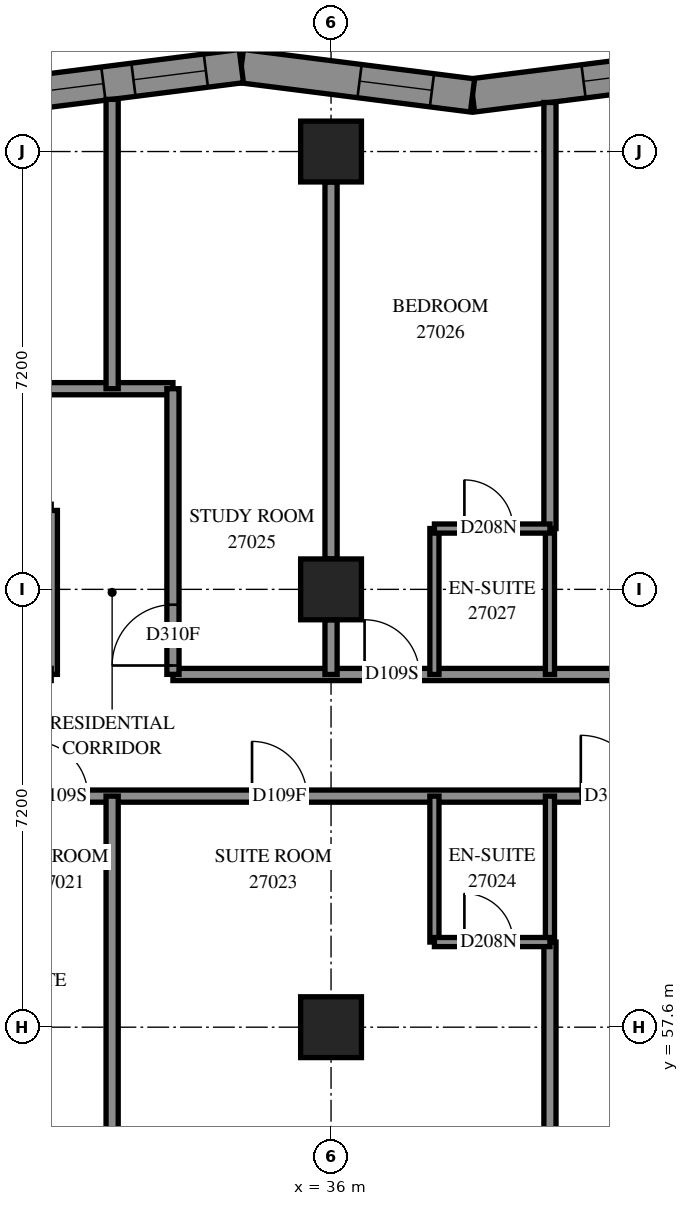
"""IFC4 building model, lengths in metres.
Left out: names, types, materials, properties, quantities, classifications, styles, units other than length and angle.
Written with IfcOpenShell. Run it as: python <this file> out.ifc"""

import sys

from ifc_helpers import new_model, si_unit, direction, frame, frame_2d, origin, origin_2d, place, context, subcontext, project, spatial, polyline, rectangle, outline, extrude, element, fill, save


model = new_model("IFC4")
c1 = context("Model", 3, precision=1e-05, world=origin(), true_north=direction((0.0, 1.0)))
c2 = subcontext(c1, "Body", "Model", "MODEL_VIEW")
j1 = project(units=[si_unit("LENGTHUNIT", "METRE"), si_unit("PLANEANGLEUNIT", "RADIAN")], contexts=[c1])
p1 = place(None, origin())
s1 = spatial("IfcSite", under=j1, at=p1, CompositionType="ELEMENT")
p2 = place(p1, origin())
s2 = spatial("IfcBuilding", under=s1, at=p2, CompositionType="ELEMENT")
p3 = place(p2, frame((0.0, 0.0, 101.6)))
s3 = spatial("IfcBuildingStorey", under=s2, at=p3, CompositionType="ELEMENT", Elevation=101.6)
for number, where, z_axis, x_axis in (
    (1, (36.0, 57.6, 0.0), (0.0, 0.0, 1.0), (1.0, 0.0, 0.0)),
    (2, (36.0, 64.8, 0.0), (0.0, 0.0, 1.0), (1.0, 0.0, 0.0)),
    (3, (36.0, 72.0, 0.0), (0.0, 0.0, 1.0), (1.0, 0.0, 0.0)),
):
    element("IfcColumn", number, at=place(p3, frame(where, z_axis=z_axis, x_axis=x_axis)), inside=s3, PredefinedType="COLUMN", context=c2, shape_type="SweptSolid", body=[
        extrude(rectangle(XDim=1.0, YDim=1.0, at=origin_2d()), origin(), (0.0, 0.0, 1.0), 3.1),
    ])
p4 = place(p3, frame((42.128, 73.405, 0.0), z_axis=(0.0, 0.0, 1.0), x_axis=(-0.9920583495, -0.1257785003, 0.0)))
e4 = element("IfcWall", 4, at=p4, inside=s3, PredefinedType="SOLIDWALL", context=c2, shape_type="SweptSolid", body=[
    extrude(outline(polyline([(-0.035, -0.275), (3.797, -0.275), (3.867, 0.275), (0.035, 0.275), (-0.035, -0.275)])), origin(), (0.0, 0.0, 1.0), 3.1),
])
p5 = place(p4, frame((0.792, 0.0, 0.5)))
e5 = element("IfcOpeningElement", 5, at=p5, cuts=e4, PredefinedType="OPENING", context=c2, shape_type="SweptSolid", body=[
    extrude(rectangle(XDim=1.2, YDim=2.45, at=frame_2d((0.6, 1.225))), frame((0.0, 0.285, 0.0), z_axis=(0.0, -1.0, 0.0), x_axis=(1.0, 0.0, 0.0)), (0.0, 0.0, 1.0), 0.57),
])
p6 = place(p3, frame((38.327, 72.923, 0.0), z_axis=(0.0, 0.0, 1.0), x_axis=(-0.9920583495, 0.1257785003, 0.0)))
e6 = element("IfcWall", 6, at=p6, inside=s3, PredefinedType="SOLIDWALL", context=c2, shape_type="SweptSolid", body=[
    extrude(outline(polyline([(0.035, -0.275), (3.867, -0.275), (3.797, 0.275), (-0.035, 0.275), (0.035, -0.275)])), origin(), (0.0, 0.0, 1.0), 3.1),
])
p7 = place(p6, frame((0.673, 0.0, 0.5)))
e7 = element("IfcOpeningElement", 7, at=p7, cuts=e6, PredefinedType="OPENING", context=c2, shape_type="SweptSolid", body=[
    extrude(rectangle(XDim=1.2, YDim=2.45, at=frame_2d((0.6, 1.225))), frame((0.0, 0.285, 0.0), z_axis=(0.0, -1.0, 0.0), x_axis=(1.0, 0.0, 0.0)), (0.0, 0.0, 1.0), 0.57),
])
p8 = place(p3, frame((34.525, 73.405, 0.0), z_axis=(0.0, 0.0, 1.0), x_axis=(-0.9920583495, -0.1257785003, 0.0)))
e8 = element("IfcWall", 8, at=p8, inside=s3, PredefinedType="SOLIDWALL", context=c2, shape_type="SweptSolid", body=[
    extrude(outline(polyline([(-0.035, -0.275), (3.797, -0.275), (3.867, 0.275), (0.035, 0.275), (-0.035, -0.275)])), origin(), (0.0, 0.0, 1.0), 3.1),
])
p9 = place(p8, frame((0.588, 0.0, 0.5)))
e9 = element("IfcOpeningElement", 9, at=p9, cuts=e8, PredefinedType="OPENING", context=c2, shape_type="SweptSolid", body=[
    extrude(rectangle(XDim=1.2, YDim=2.45, at=frame_2d((0.6, 1.225))), frame((0.0, 0.285, 0.0), z_axis=(0.0, -1.0, 0.0), x_axis=(1.0, 0.0, 0.0)), (0.0, 0.0, 1.0), 0.57),
])
p10 = place(p8, frame((2.287, 0.0, 0.5)))
e10 = element("IfcOpeningElement", 10, at=p10, cuts=e8, PredefinedType="OPENING", context=c2, shape_type="SweptSolid", body=[
    extrude(rectangle(XDim=1.2, YDim=2.45, at=frame_2d((0.6, 1.225))), frame((0.0, 0.285, 0.0), z_axis=(0.0, -1.0, 0.0), x_axis=(1.0, 0.0, 0.0)), (0.0, 0.0, 1.0), 0.57),
])
p11 = place(p3, frame((28.8, 61.4, 0.0), z_axis=(0.0, 0.0, 1.0), x_axis=(1.0, 0.0, 0.0)))
e11 = element("IfcWall", 11, at=p11, inside=s3, PredefinedType="PARTITIONING", context=c2, shape_type="SweptSolid", body=[
    extrude(rectangle(XDim=24.2, YDim=0.2, at=frame_2d((12.1, 0.0))), origin(), (0.0, 0.0, 1.0), 3.1),
])
p12 = place(p11, frame((2.3, 0.0, 0.0)))
e12 = element("IfcOpeningElement", 12, at=p12, cuts=e11, PredefinedType="OPENING", context=c2, shape_type="SweptSolid", body=[
    extrude(rectangle(XDim=0.9, YDim=2.1, at=frame_2d((0.45, 1.05))), frame((0.0, 0.11, 0.0), z_axis=(0.0, -1.0, 0.0), x_axis=(1.0, 0.0, 0.0)), (0.0, 0.0, 1.0), 0.22),
])
p13 = place(p11, frame((5.901, 0.0, 0.0)))
e13 = element("IfcOpeningElement", 13, at=p13, cuts=e11, PredefinedType="OPENING", context=c2, shape_type="SweptSolid", body=[
    extrude(rectangle(XDim=0.9, YDim=2.1, at=frame_2d((0.45, 1.05))), frame((0.0, 0.11, 0.0), z_axis=(0.0, -1.0, 0.0), x_axis=(1.0, 0.0, 0.0)), (0.0, 0.0, 1.0), 0.22),
])
p14 = place(p11, frame((11.307, 0.0, 0.0)))
e14 = element("IfcOpeningElement", 14, at=p14, cuts=e11, PredefinedType="OPENING", context=c2, shape_type="SweptSolid", body=[
    extrude(rectangle(XDim=1.0, YDim=2.1, at=frame_2d((0.5, 1.05))), frame((0.0, 0.11, 0.0), z_axis=(0.0, -1.0, 0.0), x_axis=(1.0, 0.0, 0.0)), (0.0, 0.0, 1.0), 0.22),
])
p15 = place(p11, frame((16.7, 0.0, 0.0)))
e15 = element("IfcOpeningElement", 15, at=p15, cuts=e11, PredefinedType="OPENING", context=c2, shape_type="SweptSolid", body=[
    extrude(rectangle(XDim=0.9, YDim=2.1, at=frame_2d((0.45, 1.05))), frame((0.0, 0.11, 0.0), z_axis=(0.0, -1.0, 0.0), x_axis=(1.0, 0.0, 0.0)), (0.0, 0.0, 1.0), 0.22),
])
p16 = place(p11, frame((18.508, 0.0, 0.0)))
e16 = element("IfcOpeningElement", 16, at=p16, cuts=e11, PredefinedType="OPENING", context=c2, shape_type="SweptSolid", body=[
    extrude(rectangle(XDim=1.0, YDim=2.1, at=frame_2d((0.5, 1.05))), frame((0.0, 0.11, 0.0), z_axis=(0.0, -1.0, 0.0), x_axis=(1.0, 0.0, 0.0)), (0.0, 0.0, 1.0), 0.22),
])
p17 = place(p11, frame((23.074, 0.0, 0.0)))
e17 = element("IfcOpeningElement", 17, at=p17, cuts=e11, PredefinedType="OPENING", context=c2, shape_type="SweptSolid", body=[
    extrude(rectangle(XDim=1.0, YDim=2.1, at=frame_2d((0.5, 1.05))), frame((0.0, 0.11, 0.0), z_axis=(0.0, -1.0, 0.0), x_axis=(1.0, 0.0, 0.0)), (0.0, 0.0, 1.0), 0.22),
])
p18 = place(p3, frame((33.4, 63.4, 0.0), z_axis=(0.0, 0.0, 1.0), x_axis=(1.0, 0.0, 0.0)))
e18 = element("IfcWall", 18, at=p18, inside=s3, PredefinedType="PARTITIONING", context=c2, shape_type="SweptSolid", body=[
    extrude(rectangle(XDim=21.9, YDim=0.2, at=frame_2d((10.95, 0.0))), origin(), (0.0, 0.0, 1.0), 3.1),
])
p19 = place(p18, frame((3.152, 0.0, 0.0)))
e19 = element("IfcOpeningElement", 19, at=p19, cuts=e18, PredefinedType="OPENING", context=c2, shape_type="SweptSolid", body=[
    extrude(rectangle(XDim=0.9, YDim=2.1, at=frame_2d((0.45, 1.05))), frame((0.0, 0.11, 0.0), z_axis=(0.0, -1.0, 0.0), x_axis=(1.0, 0.0, 0.0)), (0.0, 0.0, 1.0), 0.22),
])
p20 = place(p18, frame((8.161, 0.0, 0.0)))
e20 = element("IfcOpeningElement", 20, at=p20, cuts=e18, PredefinedType="OPENING", context=c2, shape_type="SweptSolid", body=[
    extrude(rectangle(XDim=0.9, YDim=2.1, at=frame_2d((0.45, 1.05))), frame((0.0, 0.11, 0.0), z_axis=(0.0, -1.0, 0.0), x_axis=(1.0, 0.0, 0.0)), (0.0, 0.0, 1.0), 0.22),
])
p21 = place(p18, frame((15.471, 0.0, 0.0)))
e21 = element("IfcOpeningElement", 21, at=p21, cuts=e18, PredefinedType="OPENING", context=c2, shape_type="SweptSolid", body=[
    extrude(rectangle(XDim=1.0, YDim=2.1, at=frame_2d((0.5, 1.05))), frame((0.0, 0.11, 0.0), z_axis=(0.0, -1.0, 0.0), x_axis=(1.0, 0.0, 0.0)), (0.0, 0.0, 1.0), 0.22),
])
p22 = place(p3, frame((21.602, 68.1, 0.0), z_axis=(0.0, 0.0, 1.0), x_axis=(1.0, 0.0, 0.0)))
e22 = element("IfcWall", 22, at=p22, inside=s3, PredefinedType="PARTITIONING", context=c2, shape_type="SweptSolid", body=[
    extrude(rectangle(XDim=11.798, YDim=0.2, at=frame_2d((5.899, 0.0))), origin(), (0.0, 0.0, 1.0), 3.1),
])
p23 = place(p22, frame((5.972, 0.0, 0.0)))
e23 = element("IfcOpeningElement", 23, at=p23, cuts=e22, PredefinedType="OPENING", context=c2, shape_type="SweptSolid", body=[
    extrude(rectangle(XDim=1.0, YDim=2.1, at=frame_2d((0.5, 1.05))), frame((0.0, 0.11, 0.0), z_axis=(0.0, -1.0, 0.0), x_axis=(1.0, 0.0, 0.0)), (0.0, 0.0, 1.0), 0.22),
])
p24 = place(p3, frame((39.6, 65.8, 0.0), z_axis=(0.0, 0.0, 1.0), x_axis=(0.0, 1.0, 0.0)))
e24 = element("IfcWall", 24, at=p24, inside=s3, PredefinedType="PARTITIONING", context=c2, shape_type="SweptSolid", body=[
    extrude(rectangle(XDim=7.007, YDim=0.2, at=frame_2d((3.504, 0.0))), origin(), (0.0, 0.0, 1.0), 3.1),
])
p25 = place(p3, frame((36.0, 65.3, 0.0), z_axis=(0.0, 0.0, 1.0), x_axis=(0.0, 1.0, 0.0)))
e25 = element("IfcWall", 25, at=p25, inside=s3, PredefinedType="PARTITIONING", context=c2, shape_type="SweptSolid", body=[
    extrude(rectangle(XDim=6.2, YDim=0.2, at=frame_2d((3.1, 0.0))), origin(), (0.0, 0.0, 1.0), 3.1),
])
p26 = place(p3, frame((32.4, 55.868, 0.0), z_axis=(0.0, 0.0, 1.0), x_axis=(0.0, 1.0, 0.0)))
e26 = element("IfcWall", 26, at=p26, inside=s3, PredefinedType="PARTITIONING", context=c2, shape_type="SweptSolid", body=[
    extrude(rectangle(XDim=5.532, YDim=0.2, at=frame_2d((2.766, 0.0))), origin(), (0.0, 0.0, 1.0), 3.1),
])
p27 = place(p3, frame((32.4, 68.1, 0.0), z_axis=(0.0, 0.0, 1.0), x_axis=(0.0, 1.0, 0.0)))
e27 = element("IfcWall", 27, at=p27, inside=s3, PredefinedType="PARTITIONING", context=c2, shape_type="SweptSolid", body=[
    extrude(rectangle(XDim=4.758, YDim=0.2, at=frame_2d((2.379, 0.0))), origin(), (0.0, 0.0, 1.0), 3.1),
])
p28 = place(p3, frame((33.4, 63.402, 0.0), z_axis=(0.0, 0.0, 1.0), x_axis=(0.0, 1.0, 0.0)))
e28 = element("IfcWall", 28, at=p28, inside=s3, PredefinedType="PARTITIONING", context=c2, shape_type="SweptSolid", body=[
    extrude(rectangle(XDim=4.698, YDim=0.2, at=frame_2d((2.349, 0.0))), origin(), (0.0, 0.0, 1.0), 3.1),
])
p29 = place(p28, frame((0.146, 0.0, 0.0)))
e29 = element("IfcOpeningElement", 29, at=p29, cuts=e28, PredefinedType="OPENING", context=c2, shape_type="SweptSolid", body=[
    extrude(rectangle(XDim=1.0, YDim=2.1, at=frame_2d((0.5, 1.05))), frame((0.0, 0.11, 0.0), z_axis=(0.0, -1.0, 0.0), x_axis=(1.0, 0.0, 0.0)), (0.0, 0.0, 1.0), 0.22),
])
p30 = place(p3, frame((39.6, 55.868, 0.0), z_axis=(0.0, 0.0, 1.0), x_axis=(0.0, 1.0, 0.0)))
e30 = element("IfcWall", 30, at=p30, inside=s3, PredefinedType="PARTITIONING", context=c2, shape_type="SweptSolid", body=[
    extrude(rectangle(XDim=3.132, YDim=0.2, at=frame_2d((1.566, 0.0))), origin(), (0.0, 0.0, 1.0), 3.1),
])
p31 = place(p3, frame((31.4, 63.402, 0.0), z_axis=(0.0, 0.0, 1.0), x_axis=(0.0, 1.0, 0.0)))
e31 = element("IfcWall", 31, at=p31, inside=s3, PredefinedType="PARTITIONING", context=c2, shape_type="SweptSolid", body=[
    extrude(rectangle(XDim=2.696, YDim=0.2, at=frame_2d((1.348, 0.0))), origin(), (0.0, 0.0, 1.0), 3.1),
])
for number, where, z_axis, x_axis in (
    (32, (37.7, 59.0, 0.0), (0.0, 0.0, 1.0), (0.0, 1.0, 0.0)),
    (33, (37.7, 63.4, 0.0), (0.0, 0.0, 1.0), (0.0, 1.0, 0.0)),
    (34, (39.6, 59.0, 0.0), (0.0, 0.0, 1.0), (0.0, 1.0, 0.0)),
    (35, (39.6, 63.4, 0.0), (0.0, 0.0, 1.0), (0.0, 1.0, 0.0)),
):
    element("IfcWall", number, at=place(p3, frame(where, z_axis=z_axis, x_axis=x_axis)), inside=s3, PredefinedType="PARTITIONING", context=c2, shape_type="SweptSolid", body=[
        extrude(rectangle(XDim=2.4, YDim=0.15, at=frame_2d((1.2, 0.0))), origin(), (0.0, 0.0, 1.0), 3.1),
    ])
p32 = place(p3, frame((37.7, 59.0, 0.0), z_axis=(0.0, 0.0, 1.0), x_axis=(1.0, 0.0, 0.0)))
e36 = element("IfcWall", 36, at=p32, inside=s3, PredefinedType="PARTITIONING", context=c2, shape_type="SweptSolid", body=[
    extrude(rectangle(XDim=1.9, YDim=0.15, at=frame_2d((0.95, 0.0))), origin(), (0.0, 0.0, 1.0), 3.1),
])
p33 = place(p32, frame((0.493, 0.0, 0.0)))
e37 = element("IfcOpeningElement", 37, at=p33, cuts=e36, PredefinedType="OPENING", context=c2, shape_type="SweptSolid", body=[
    extrude(rectangle(XDim=0.8, YDim=2.1, at=frame_2d((0.4, 1.05))), frame((0.0, 0.085, 0.0), z_axis=(0.0, -1.0, 0.0), x_axis=(1.0, 0.0, 0.0)), (0.0, 0.0, 1.0), 0.17),
])
p34 = place(p3, frame((37.7, 65.8, 0.0), z_axis=(0.0, 0.0, 1.0), x_axis=(1.0, 0.0, 0.0)))
e38 = element("IfcWall", 38, at=p34, inside=s3, PredefinedType="PARTITIONING", context=c2, shape_type="SweptSolid", body=[
    extrude(rectangle(XDim=1.9, YDim=0.15, at=frame_2d((0.95, 0.0))), origin(), (0.0, 0.0, 1.0), 3.1),
])
p35 = place(p34, frame((0.493, 0.0, 0.0)))
e39 = element("IfcOpeningElement", 39, at=p35, cuts=e38, PredefinedType="OPENING", context=c2, shape_type="SweptSolid", body=[
    extrude(rectangle(XDim=0.8, YDim=2.1, at=frame_2d((0.4, 1.05))), frame((0.0, 0.085, 0.0), z_axis=(0.0, -1.0, 0.0), x_axis=(1.0, 0.0, 0.0)), (0.0, 0.0, 1.0), 0.17),
])
p36 = place(p3, frame((36.0, 63.4, 0.0), z_axis=(0.0, 0.0, 1.0), x_axis=(0.0, 1.0, 0.0)))
e40 = element("IfcWall", 40, at=p36, inside=s3, PredefinedType="PARTITIONING", context=c2, shape_type="SweptSolid", body=[
    extrude(rectangle(XDim=0.9, YDim=0.2, at=frame_2d((0.45, 0.0))), origin(), (0.0, 0.0, 1.0), 3.1),
])
p37 = place(p5, origin())
e41 = element("IfcWindow", 41, at=p37, inside=s3, PartitioningType="SINGLE_PANEL", PredefinedType="WINDOW", context=c2, shape_type="SweptSolid", body=[
    extrude(rectangle(XDim=1.2, YDim=2.45, at=frame_2d((0.6, 1.225))), frame((0.0, 0.155, 0.0), z_axis=(0.0, -1.0, 0.0), x_axis=(1.0, 0.0, 0.0)), (0.0, 0.0, 1.0), 0.06),
])
fill(e5, e41)
p38 = place(p7, origin())
e42 = element("IfcWindow", 42, at=p38, inside=s3, PartitioningType="SINGLE_PANEL", PredefinedType="WINDOW", context=c2, shape_type="SweptSolid", body=[
    extrude(rectangle(XDim=1.2, YDim=2.45, at=frame_2d((0.6, 1.225))), frame((0.0, 0.155, 0.0), z_axis=(0.0, -1.0, 0.0), x_axis=(1.0, 0.0, 0.0)), (0.0, 0.0, 1.0), 0.06),
])
fill(e7, e42)
p39 = place(p9, origin())
e43 = element("IfcWindow", 43, at=p39, inside=s3, PartitioningType="SINGLE_PANEL", PredefinedType="WINDOW", context=c2, shape_type="SweptSolid", body=[
    extrude(rectangle(XDim=1.2, YDim=2.45, at=frame_2d((0.6, 1.225))), frame((0.0, 0.155, 0.0), z_axis=(0.0, -1.0, 0.0), x_axis=(1.0, 0.0, 0.0)), (0.0, 0.0, 1.0), 0.06),
])
fill(e9, e43)
p40 = place(p10, origin())
e44 = element("IfcWindow", 44, at=p40, inside=s3, PartitioningType="SINGLE_PANEL", PredefinedType="WINDOW", context=c2, shape_type="SweptSolid", body=[
    extrude(rectangle(XDim=1.2, YDim=2.45, at=frame_2d((0.6, 1.225))), frame((0.0, 0.155, 0.0), z_axis=(0.0, -1.0, 0.0), x_axis=(1.0, 0.0, 0.0)), (0.0, 0.0, 1.0), 0.06),
])
fill(e10, e44)
p41 = place(p12, origin())
e45 = element("IfcDoor", 45, at=p41, inside=s3, OperationType="SINGLE_SWING_LEFT", PredefinedType="DOOR", context=c2, shape_type="SweptSolid", body=[
    extrude(rectangle(XDim=0.9, YDim=2.1, at=frame_2d((0.45, 1.05))), frame((0.0, 0.025, 0.0), z_axis=(0.0, -1.0, 0.0), x_axis=(1.0, 0.0, 0.0)), (0.0, 0.0, 1.0), 0.05),
])
fill(e12, e45)
p42 = place(p13, origin())
e46 = element("IfcDoor", 46, at=p42, inside=s3, OperationType="SINGLE_SWING_RIGHT", PredefinedType="DOOR", context=c2, shape_type="SweptSolid", body=[
    extrude(rectangle(XDim=0.9, YDim=2.1, at=frame_2d((0.45, 1.05))), frame((0.0, 0.025, 0.0), z_axis=(0.0, -1.0, 0.0), x_axis=(1.0, 0.0, 0.0)), (0.0, 0.0, 1.0), 0.05),
])
fill(e13, e46)
p43 = place(p33, origin())
e47 = element("IfcDoor", 47, at=p43, inside=s3, OperationType="SINGLE_SWING_RIGHT", PredefinedType="DOOR", context=c2, shape_type="SweptSolid", body=[
    extrude(rectangle(XDim=0.8, YDim=2.1, at=frame_2d((0.4, 1.05))), frame((0.0, 0.025, 0.0), z_axis=(0.0, -1.0, 0.0), x_axis=(1.0, 0.0, 0.0)), (0.0, 0.0, 1.0), 0.05),
])
fill(e37, e47)
p44 = place(p29, origin())
e48 = element("IfcDoor", 48, at=p44, inside=s3, OperationType="SINGLE_SWING_LEFT", PredefinedType="DOOR", context=c2, shape_type="SweptSolid", body=[
    extrude(rectangle(XDim=1.0, YDim=2.1, at=frame_2d((0.5, 1.05))), frame((0.0, 0.025, 0.0), z_axis=(0.0, -1.0, 0.0), x_axis=(1.0, 0.0, 0.0)), (0.0, 0.0, 1.0), 0.05),
])
fill(e29, e48)
p45 = place(p19, origin())
e49 = element("IfcDoor", 49, at=p45, inside=s3, OperationType="SINGLE_SWING_RIGHT", PredefinedType="DOOR", context=c2, shape_type="SweptSolid", body=[
    extrude(rectangle(XDim=0.9, YDim=2.1, at=frame_2d((0.45, 1.05))), frame((0.0, 0.025, 0.0), z_axis=(0.0, -1.0, 0.0), x_axis=(1.0, 0.0, 0.0)), (0.0, 0.0, 1.0), 0.05),
])
fill(e19, e49)
p46 = place(p35, origin())
e50 = element("IfcDoor", 50, at=p46, inside=s3, OperationType="SINGLE_SWING_RIGHT", PredefinedType="DOOR", context=c2, shape_type="SweptSolid", body=[
    extrude(rectangle(XDim=0.8, YDim=2.1, at=frame_2d((0.4, 1.05))), frame((0.0, 0.025, 0.0), z_axis=(0.0, -1.0, 0.0), x_axis=(1.0, 0.0, 0.0)), (0.0, 0.0, 1.0), 0.05),
])
fill(e39, e50)
p47 = place(p14, origin())
e51 = element("IfcDoor", 51, at=p47, inside=s3, OperationType="SINGLE_SWING_RIGHT", PredefinedType="DOOR", context=c2, shape_type="SweptSolid", body=[
    extrude(rectangle(XDim=1.0, YDim=2.1, at=frame_2d((0.5, 1.05))), frame((0.0, 0.025, 0.0), z_axis=(0.0, -1.0, 0.0), x_axis=(1.0, 0.0, 0.0)), (0.0, 0.0, 1.0), 0.05),
])
fill(e14, e51)
save(model, sys.argv[1])
